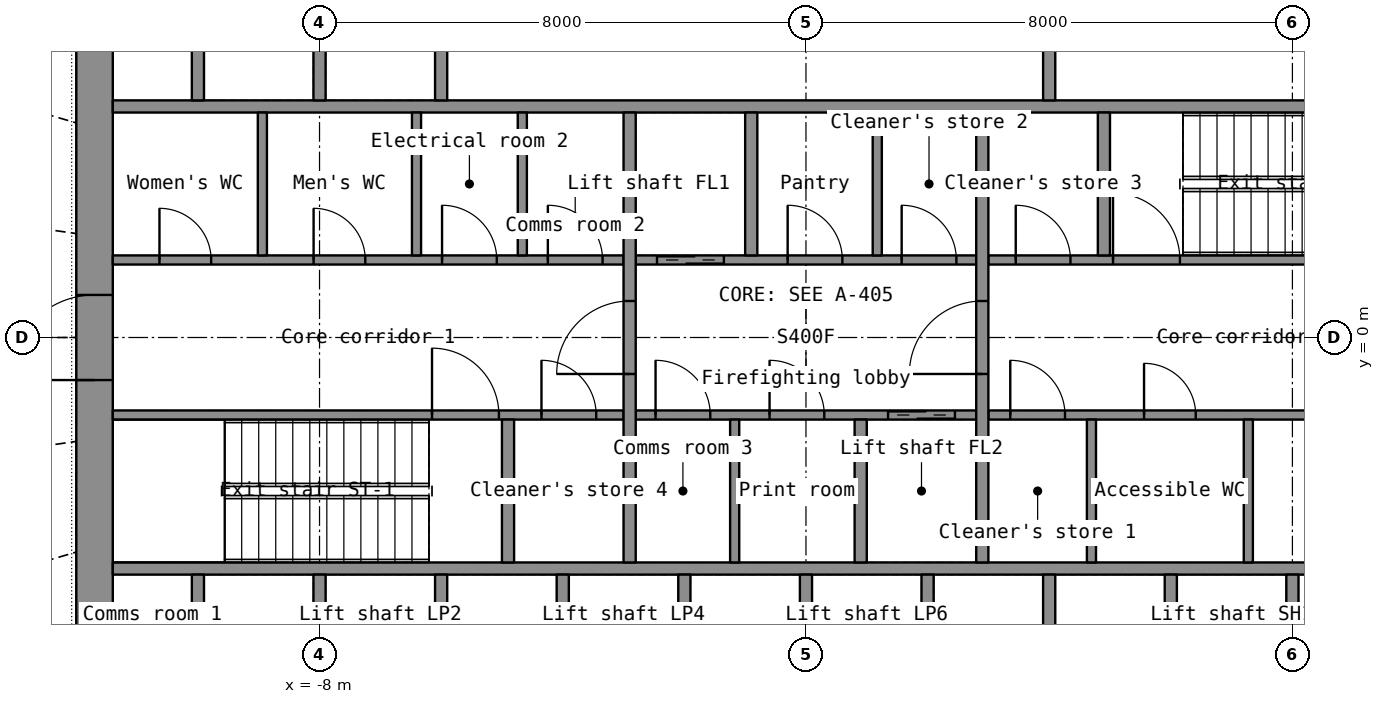
"""IFC4 building model, lengths in metres.
Left out: names, types, materials, properties, quantities, classifications, styles, units other than length and angle.
Written with IfcOpenShell. Run it as: python <this file> out.ifc"""

import sys

from ifc_helpers import new_model, si_unit, direction, frame, frame_2d, origin, place, context, subcontext, project, spatial, rectangle, extrude, element, fill, save


model = new_model("IFC4")
c1 = context("Model", 3, precision=1e-05, world=origin(), true_north=direction((0.0, 1.0)))
c2 = subcontext(c1, "Body", "Model", "MODEL_VIEW")
j1 = project(units=[si_unit("LENGTHUNIT", "METRE"), si_unit("PLANEANGLEUNIT", "RADIAN")], contexts=[c1])
p1 = place(None, origin())
s1 = spatial("IfcSite", under=j1, at=p1, CompositionType="ELEMENT")
p2 = place(p1, origin())
s2 = spatial("IfcBuilding", under=s1, at=p2, CompositionType="ELEMENT")
p3 = place(p2, frame((0.0, 0.0, 20.0)))
s3 = spatial("IfcBuildingStorey", under=s2, at=p3, CompositionType="ELEMENT", Elevation=20.0)
p4 = place(p3, frame((-11.7, -7.2, 0.0), z_axis=(0.0, 0.0, 1.0), x_axis=(0.0, 1.0, 0.0)))
e1 = element("IfcWall", 1, at=p4, inside=s3, PredefinedType="SHEAR", context=c2, shape_type="SweptSolid", body=[
    extrude(rectangle(XDim=14.4, YDim=0.6, at=frame_2d((7.2, 0.0))), origin(), (0.0, 0.0, 1.0), 4.1),
])
p5 = place(p4, frame((6.5, 0.0, 0.0)))
e2 = element("IfcOpeningElement", 2, at=p5, cuts=e1, PredefinedType="OPENING", context=c2, shape_type="SweptSolid", body=[
    extrude(rectangle(XDim=1.4, YDim=2.2, at=frame_2d((0.7, 1.1))), frame((0.0, 0.31, 0.0), z_axis=(0.0, -1.0, 0.0), x_axis=(1.0, 0.0, 0.0)), (0.0, 0.0, 1.0), 0.62),
])
for number, where, z_axis, x_axis in (
    (3, (-11.4, -3.8, 0.0), (0.0, 0.0, 1.0), (1.0, 0.0, 0.0)),
    (4, (-11.4, 3.8, 0.0), (0.0, 0.0, 1.0), (1.0, 0.0, 0.0)),
):
    element("IfcWall", number, at=place(p3, frame(where, z_axis=z_axis, x_axis=x_axis)), inside=s3, PredefinedType="SHEAR", context=c2, shape_type="SweptSolid", body=[
        extrude(rectangle(XDim=22.8, YDim=0.2, at=frame_2d((11.4, 0.0))), origin(), (0.0, 0.0, 1.0), 4.1),
    ])
for number, where, z_axis, x_axis in (
    (5, (-10.0, -6.6, 0.0), (0.0, 0.0, 1.0), (0.0, 1.0, 0.0)),
    (6, (-8.0, -6.6, 0.0), (0.0, 0.0, 1.0), (0.0, 1.0, 0.0)),
    (7, (-6.0, -6.6, 0.0), (0.0, 0.0, 1.0), (0.0, 1.0, 0.0)),
    (8, (-4.0, -6.6, 0.0), (0.0, 0.0, 1.0), (0.0, 1.0, 0.0)),
    (9, (-2.0, -6.6, 0.0), (0.0, 0.0, 1.0), (0.0, 1.0, 0.0)),
    (10, (0.0, -6.6, 0.0), (0.0, 0.0, 1.0), (0.0, 1.0, 0.0)),
    (11, (2.0, -6.6, 0.0), (0.0, 0.0, 1.0), (0.0, 1.0, 0.0)),
    (12, (4.0, -6.6, 0.0), (0.0, 0.0, 1.0), (0.0, 1.0, 0.0)),
    (13, (6.0, -6.6, 0.0), (0.0, 0.0, 1.0), (0.0, 1.0, 0.0)),
    (14, (8.0, -6.6, 0.0), (0.0, 0.0, 1.0), (0.0, 1.0, 0.0)),
    (15, (-10.0, 3.9, 0.0), (0.0, 0.0, 1.0), (0.0, 1.0, 0.0)),
    (16, (-8.0, 3.9, 0.0), (0.0, 0.0, 1.0), (0.0, 1.0, 0.0)),
    (17, (-6.0, 3.9, 0.0), (0.0, 0.0, 1.0), (0.0, 1.0, 0.0)),
):
    element("IfcWall", number, at=place(p3, frame(where, z_axis=z_axis, x_axis=x_axis)), inside=s3, PredefinedType="SHEAR", context=c2, shape_type="SweptSolid", body=[
        extrude(rectangle(XDim=2.7, YDim=0.2, at=frame_2d((1.35, 0.0))), origin(), (0.0, 0.0, 1.0), 4.1),
    ])
p6 = place(p3, frame((4.0, 3.9, 0.0), z_axis=(0.0, 0.0, 1.0), x_axis=(0.0, 1.0, 0.0)))
e18 = element("IfcWall", 18, at=p6, inside=s3, PredefinedType="PARTITIONING", context=c2, shape_type="SweptSolid", body=[
    extrude(rectangle(XDim=2.7, YDim=0.2, at=frame_2d((1.35, 0.0))), origin(), (0.0, 0.0, 1.0), 4.1),
])
p7 = place(p3, frame((-11.4, -1.275, 0.0), z_axis=(0.0, 0.0, 1.0), x_axis=(1.0, 0.0, 0.0)))
e19 = element("IfcWall", 19, at=p7, inside=s3, PredefinedType="SHEAR", context=c2, shape_type="SweptSolid", body=[
    extrude(rectangle(XDim=8.4, YDim=0.15, at=frame_2d((4.2, 0.0))), origin(), (0.0, 0.0, 1.0), 4.1),
])
p8 = place(p7, frame((5.25, 0.0, 0.0)))
e20 = element("IfcOpeningElement", 20, at=p8, cuts=e19, PredefinedType="OPENING", context=c2, shape_type="SweptSolid", body=[
    extrude(rectangle(XDim=1.1, YDim=2.15, at=frame_2d((0.55, 1.075))), frame((0.0, 0.085, 0.0), z_axis=(0.0, -1.0, 0.0), x_axis=(1.0, 0.0, 0.0)), (0.0, 0.0, 1.0), 0.17),
])
p9 = place(p7, frame((7.05, 0.0, 0.0)))
e21 = element("IfcOpeningElement", 21, at=p9, cuts=e19, PredefinedType="OPENING", context=c2, shape_type="SweptSolid", body=[
    extrude(rectangle(XDim=0.9, YDim=2.1, at=frame_2d((0.45, 1.05))), frame((0.0, 0.085, 0.0), z_axis=(0.0, -1.0, 0.0), x_axis=(1.0, 0.0, 0.0)), (0.0, 0.0, 1.0), 0.17),
])
p10 = place(p3, frame((-2.8, -1.275, 0.0), z_axis=(0.0, 0.0, 1.0), x_axis=(1.0, 0.0, 0.0)))
e22 = element("IfcWall", 22, at=p10, inside=s3, PredefinedType="SHEAR", context=c2, shape_type="SweptSolid", body=[
    extrude(rectangle(XDim=5.6, YDim=0.15, at=frame_2d((2.8, 0.0))), origin(), (0.0, 0.0, 1.0), 4.1),
])
p11 = place(p10, frame((4.15, 0.0, 0.0)))
e23 = element("IfcOpeningElement", 23, at=p11, cuts=e22, PredefinedType="OPENING", context=c2, shape_type="SweptSolid", body=[
    extrude(rectangle(XDim=1.1, YDim=2.2, at=frame_2d((0.55, 1.1))), frame((0.0, 0.085, 0.0), z_axis=(0.0, -1.0, 0.0), x_axis=(1.0, 0.0, 0.0)), (0.0, 0.0, 1.0), 0.17),
])
p12 = place(p10, frame((0.326, 0.0, 0.0)))
e24 = element("IfcOpeningElement", 24, at=p12, cuts=e22, PredefinedType="OPENING", context=c2, shape_type="SweptSolid", body=[
    extrude(rectangle(XDim=0.9, YDim=2.1, at=frame_2d((0.45, 1.05))), frame((0.0, 0.085, 0.0), z_axis=(0.0, -1.0, 0.0), x_axis=(1.0, 0.0, 0.0)), (0.0, 0.0, 1.0), 0.17),
])
p13 = place(p10, frame((2.201, 0.0, 0.0)))
e25 = element("IfcOpeningElement", 25, at=p13, cuts=e22, PredefinedType="OPENING", context=c2, shape_type="SweptSolid", body=[
    extrude(rectangle(XDim=0.9, YDim=2.1, at=frame_2d((0.45, 1.05))), frame((0.0, 0.085, 0.0), z_axis=(0.0, -1.0, 0.0), x_axis=(1.0, 0.0, 0.0)), (0.0, 0.0, 1.0), 0.17),
])
p14 = place(p3, frame((3.0, -1.275, 0.0), z_axis=(0.0, 0.0, 1.0), x_axis=(1.0, 0.0, 0.0)))
e26 = element("IfcWall", 26, at=p14, inside=s3, PredefinedType="PARTITIONING", context=c2, shape_type="SweptSolid", body=[
    extrude(rectangle(XDim=8.4, YDim=0.15, at=frame_2d((4.2, 0.0))), origin(), (0.0, 0.0, 1.0), 4.1),
])
p15 = place(p14, frame((0.36, 0.0, 0.0)))
e27 = element("IfcOpeningElement", 27, at=p15, cuts=e26, PredefinedType="OPENING", context=c2, shape_type="SweptSolid", body=[
    extrude(rectangle(XDim=0.9, YDim=2.1, at=frame_2d((0.45, 1.05))), frame((0.0, 0.085, 0.0), z_axis=(0.0, -1.0, 0.0), x_axis=(1.0, 0.0, 0.0)), (0.0, 0.0, 1.0), 0.17),
])
p16 = place(p14, frame((2.56, 0.0, 0.0)))
e28 = element("IfcOpeningElement", 28, at=p16, cuts=e26, PredefinedType="OPENING", context=c2, shape_type="SweptSolid", body=[
    extrude(rectangle(XDim=0.85, YDim=2.1, at=frame_2d((0.425, 1.05))), frame((0.0, 0.085, 0.0), z_axis=(0.0, -1.0, 0.0), x_axis=(1.0, 0.0, 0.0)), (0.0, 0.0, 1.0), 0.17),
])
p17 = place(p14, frame((5.95, 0.0, 0.0)))
e29 = element("IfcOpeningElement", 29, at=p17, cuts=e26, PredefinedType="OPENING", context=c2, shape_type="SweptSolid", body=[
    extrude(rectangle(XDim=0.85, YDim=2.1, at=frame_2d((0.425, 1.05))), frame((0.0, 0.085, 0.0), z_axis=(0.0, -1.0, 0.0), x_axis=(1.0, 0.0, 0.0)), (0.0, 0.0, 1.0), 0.17),
])
p18 = place(p3, frame((-11.4, 1.275, 0.0), z_axis=(0.0, 0.0, 1.0), x_axis=(1.0, 0.0, 0.0)))
e30 = element("IfcWall", 30, at=p18, inside=s3, PredefinedType="PARTITIONING", context=c2, shape_type="SweptSolid", body=[
    extrude(rectangle(XDim=8.4, YDim=0.15, at=frame_2d((4.2, 0.0))), origin(), (0.0, 0.0, 1.0), 4.1),
])
p19 = place(p18, frame((0.768, 0.0, 0.0)))
e31 = element("IfcOpeningElement", 31, at=p19, cuts=e30, PredefinedType="OPENING", context=c2, shape_type="SweptSolid", body=[
    extrude(rectangle(XDim=0.85, YDim=2.1, at=frame_2d((0.425, 1.05))), frame((0.0, 0.085, 0.0), z_axis=(0.0, -1.0, 0.0), x_axis=(1.0, 0.0, 0.0)), (0.0, 0.0, 1.0), 0.17),
])
p20 = place(p18, frame((3.302, 0.0, 0.0)))
e32 = element("IfcOpeningElement", 32, at=p20, cuts=e30, PredefinedType="OPENING", context=c2, shape_type="SweptSolid", body=[
    extrude(rectangle(XDim=0.85, YDim=2.1, at=frame_2d((0.425, 1.05))), frame((0.0, 0.085, 0.0), z_axis=(0.0, -1.0, 0.0), x_axis=(1.0, 0.0, 0.0)), (0.0, 0.0, 1.0), 0.17),
])
p21 = place(p18, frame((5.415, 0.0, 0.0)))
e33 = element("IfcOpeningElement", 33, at=p21, cuts=e30, PredefinedType="OPENING", context=c2, shape_type="SweptSolid", body=[
    extrude(rectangle(XDim=0.9, YDim=2.1, at=frame_2d((0.45, 1.05))), frame((0.0, 0.085, 0.0), z_axis=(0.0, -1.0, 0.0), x_axis=(1.0, 0.0, 0.0)), (0.0, 0.0, 1.0), 0.17),
])
p22 = place(p18, frame((7.155, 0.0, 0.0)))
e34 = element("IfcOpeningElement", 34, at=p22, cuts=e30, PredefinedType="OPENING", context=c2, shape_type="SweptSolid", body=[
    extrude(rectangle(XDim=0.9, YDim=2.1, at=frame_2d((0.45, 1.05))), frame((0.0, 0.085, 0.0), z_axis=(0.0, -1.0, 0.0), x_axis=(1.0, 0.0, 0.0)), (0.0, 0.0, 1.0), 0.17),
])
p23 = place(p3, frame((-2.8, 1.275, 0.0), z_axis=(0.0, 0.0, 1.0), x_axis=(1.0, 0.0, 0.0)))
e35 = element("IfcWall", 35, at=p23, inside=s3, PredefinedType="SHEAR", context=c2, shape_type="SweptSolid", body=[
    extrude(rectangle(XDim=5.6, YDim=0.15, at=frame_2d((2.8, 0.0))), origin(), (0.0, 0.0, 1.0), 4.1),
])
p24 = place(p23, frame((0.35, 0.0, 0.0)))
e36 = element("IfcOpeningElement", 36, at=p24, cuts=e35, PredefinedType="OPENING", context=c2, shape_type="SweptSolid", body=[
    extrude(rectangle(XDim=1.1, YDim=2.2, at=frame_2d((0.55, 1.1))), frame((0.0, 0.085, 0.0), z_axis=(0.0, -1.0, 0.0), x_axis=(1.0, 0.0, 0.0)), (0.0, 0.0, 1.0), 0.17),
])
p25 = place(p23, frame((2.499, 0.0, 0.0)))
e37 = element("IfcOpeningElement", 37, at=p25, cuts=e35, PredefinedType="OPENING", context=c2, shape_type="SweptSolid", body=[
    extrude(rectangle(XDim=0.9, YDim=2.1, at=frame_2d((0.45, 1.05))), frame((0.0, 0.085, 0.0), z_axis=(0.0, -1.0, 0.0), x_axis=(1.0, 0.0, 0.0)), (0.0, 0.0, 1.0), 0.17),
])
p26 = place(p23, frame((4.374, 0.0, 0.0)))
e38 = element("IfcOpeningElement", 38, at=p26, cuts=e35, PredefinedType="OPENING", context=c2, shape_type="SweptSolid", body=[
    extrude(rectangle(XDim=0.9, YDim=2.1, at=frame_2d((0.45, 1.05))), frame((0.0, 0.085, 0.0), z_axis=(0.0, -1.0, 0.0), x_axis=(1.0, 0.0, 0.0)), (0.0, 0.0, 1.0), 0.17),
])
p27 = place(p3, frame((3.0, 1.275, 0.0), z_axis=(0.0, 0.0, 1.0), x_axis=(1.0, 0.0, 0.0)))
e39 = element("IfcWall", 39, at=p27, inside=s3, PredefinedType="SHEAR", context=c2, shape_type="SweptSolid", body=[
    extrude(rectangle(XDim=8.4, YDim=0.15, at=frame_2d((4.2, 0.0))), origin(), (0.0, 0.0, 1.0), 4.1),
])
p28 = place(p27, frame((2.05, 0.0, 0.0)))
e40 = element("IfcOpeningElement", 40, at=p28, cuts=e39, PredefinedType="OPENING", context=c2, shape_type="SweptSolid", body=[
    extrude(rectangle(XDim=1.1, YDim=2.15, at=frame_2d((0.55, 1.075))), frame((0.0, 0.085, 0.0), z_axis=(0.0, -1.0, 0.0), x_axis=(1.0, 0.0, 0.0)), (0.0, 0.0, 1.0), 0.17),
])
p29 = place(p27, frame((0.45, 0.0, 0.0)))
e41 = element("IfcOpeningElement", 41, at=p29, cuts=e39, PredefinedType="OPENING", context=c2, shape_type="SweptSolid", body=[
    extrude(rectangle(XDim=0.9, YDim=2.1, at=frame_2d((0.45, 1.05))), frame((0.0, 0.085, 0.0), z_axis=(0.0, -1.0, 0.0), x_axis=(1.0, 0.0, 0.0)), (0.0, 0.0, 1.0), 0.17),
])
p30 = place(p3, frame((-2.9, -3.7, 0.0), z_axis=(0.0, 0.0, 1.0), x_axis=(0.0, 1.0, 0.0)))
e42 = element("IfcWall", 42, at=p30, inside=s3, PredefinedType="SHEAR", context=c2, shape_type="SweptSolid", body=[
    extrude(rectangle(XDim=7.4, YDim=0.2, at=frame_2d((3.7, 0.0))), origin(), (0.0, 0.0, 1.0), 4.1),
])
p31 = place(p30, frame((3.1, 0.0, 0.0)))
e43 = element("IfcOpeningElement", 43, at=p31, cuts=e42, PredefinedType="OPENING", context=c2, shape_type="SweptSolid", body=[
    extrude(rectangle(XDim=1.2, YDim=2.2, at=frame_2d((0.6, 1.1))), frame((0.0, 0.11, 0.0), z_axis=(0.0, -1.0, 0.0), x_axis=(1.0, 0.0, 0.0)), (0.0, 0.0, 1.0), 0.22),
])
p32 = place(p3, frame((2.9, -3.7, 0.0), z_axis=(0.0, 0.0, 1.0), x_axis=(0.0, 1.0, 0.0)))
e44 = element("IfcWall", 44, at=p32, inside=s3, PredefinedType="SHEAR", context=c2, shape_type="SweptSolid", body=[
    extrude(rectangle(XDim=7.4, YDim=0.2, at=frame_2d((3.7, 0.0))), origin(), (0.0, 0.0, 1.0), 4.1),
])
p33 = place(p32, frame((3.1, 0.0, 0.0)))
e45 = element("IfcOpeningElement", 45, at=p33, cuts=e44, PredefinedType="OPENING", context=c2, shape_type="SweptSolid", body=[
    extrude(rectangle(XDim=1.2, YDim=2.2, at=frame_2d((0.6, 1.1))), frame((0.0, 0.11, 0.0), z_axis=(0.0, -1.0, 0.0), x_axis=(1.0, 0.0, 0.0)), (0.0, 0.0, 1.0), 0.22),
])
for number, where, z_axis, x_axis in (
    (46, (-0.9, 1.35, 0.0), (0.0, 0.0, 1.0), (0.0, 1.0, 0.0)),
    (47, (0.9, -3.7, 0.0), (0.0, 0.0, 1.0), (0.0, 1.0, 0.0)),
    (48, (-4.9, -3.7, 0.0), (0.0, 0.0, 1.0), (0.0, 1.0, 0.0)),
    (49, (4.9, 1.35, 0.0), (0.0, 0.0, 1.0), (0.0, 1.0, 0.0)),
):
    element("IfcWall", number, at=place(p3, frame(where, z_axis=z_axis, x_axis=x_axis)), inside=s3, PredefinedType="SHEAR", context=c2, shape_type="SweptSolid", body=[
        extrude(rectangle(XDim=2.35, YDim=0.2, at=frame_2d((1.175, 0.0))), origin(), (0.0, 0.0, 1.0), 4.1),
    ])
for number, where, z_axis, x_axis in (
    (50, (-8.94, 1.35, 0.0), (0.0, 0.0, 1.0), (0.0, 1.0, 0.0)),
    (51, (-6.405, 1.35, 0.0), (0.0, 0.0, 1.0), (0.0, 1.0, 0.0)),
    (52, (-4.665, 1.35, 0.0), (0.0, 0.0, 1.0), (0.0, 1.0, 0.0)),
    (53, (4.695, -3.7, 0.0), (0.0, 0.0, 1.0), (0.0, 1.0, 0.0)),
    (54, (7.275, -3.7, 0.0), (0.0, 0.0, 1.0), (0.0, 1.0, 0.0)),
    (55, (1.173, 1.35, 0.0), (0.0, 0.0, 1.0), (0.0, 1.0, 0.0)),
    (56, (-1.173, -3.7, 0.0), (0.0, 0.0, 1.0), (0.0, 1.0, 0.0)),
):
    element("IfcWall", number, at=place(p3, frame(where, z_axis=z_axis, x_axis=x_axis)), inside=s3, PredefinedType="PARTITIONING", context=c2, shape_type="SweptSolid", body=[
        extrude(rectangle(XDim=2.35, YDim=0.15, at=frame_2d((1.175, 0.0))), origin(), (0.0, 0.0, 1.0), 4.1),
    ])
p34 = place(p5, origin())
e57 = element("IfcDoor", 57, at=p34, inside=s3, OperationType="DOUBLE_DOOR_SINGLE_SWING", PredefinedType="DOOR", context=c2, shape_type="SweptSolid", body=[
    extrude(rectangle(XDim=1.4, YDim=2.2, at=frame_2d((0.7, 1.1))), frame((0.0, 0.025, 0.0), z_axis=(0.0, -1.0, 0.0), x_axis=(1.0, 0.0, 0.0)), (0.0, 0.0, 1.0), 0.05),
])
fill(e2, e57)
p35 = place(p31, origin())
e58 = element("IfcDoor", 58, at=p35, inside=s3, OperationType="SINGLE_SWING_LEFT", PredefinedType="DOOR", context=c2, shape_type="SweptSolid", body=[
    extrude(rectangle(XDim=1.2, YDim=2.2, at=frame_2d((0.6, 1.1))), frame((0.0, 0.025, 0.0), z_axis=(0.0, -1.0, 0.0), x_axis=(1.0, 0.0, 0.0)), (0.0, 0.0, 1.0), 0.05),
])
fill(e43, e58)
p36 = place(p33, origin())
e59 = element("IfcDoor", 59, at=p36, inside=s3, OperationType="SINGLE_SWING_LEFT", PredefinedType="DOOR", context=c2, shape_type="SweptSolid", body=[
    extrude(rectangle(XDim=1.2, YDim=2.2, at=frame_2d((0.6, 1.1))), frame((0.0, 0.025, 0.0), z_axis=(0.0, -1.0, 0.0), x_axis=(1.0, 0.0, 0.0)), (0.0, 0.0, 1.0), 0.05),
])
fill(e45, e59)
p37 = place(p24, origin())
e60 = element("IfcDoor", 60, at=p37, inside=s3, OperationType="DOUBLE_DOOR_SLIDING", PredefinedType="DOOR", context=c2, shape_type="SweptSolid", body=[
    extrude(rectangle(XDim=1.1, YDim=2.2, at=frame_2d((0.55, 1.1))), frame((0.0, 0.025, 0.0), z_axis=(0.0, -1.0, 0.0), x_axis=(1.0, 0.0, 0.0)), (0.0, 0.0, 1.0), 0.05),
])
fill(e36, e60)
p38 = place(p11, origin())
e61 = element("IfcDoor", 61, at=p38, inside=s3, OperationType="DOUBLE_DOOR_SLIDING", PredefinedType="DOOR", context=c2, shape_type="SweptSolid", body=[
    extrude(rectangle(XDim=1.1, YDim=2.2, at=frame_2d((0.55, 1.1))), frame((0.0, 0.025, 0.0), z_axis=(0.0, -1.0, 0.0), x_axis=(1.0, 0.0, 0.0)), (0.0, 0.0, 1.0), 0.05),
])
fill(e23, e61)
p39 = place(p8, origin())
e62 = element("IfcDoor", 62, at=p39, inside=s3, OperationType="SINGLE_SWING_LEFT", PredefinedType="DOOR", context=c2, shape_type="SweptSolid", body=[
    extrude(rectangle(XDim=1.1, YDim=2.15, at=frame_2d((0.55, 1.075))), frame((0.0, 0.025, 0.0), z_axis=(0.0, -1.0, 0.0), x_axis=(1.0, 0.0, 0.0)), (0.0, 0.0, 1.0), 0.05),
])
fill(e20, e62)
p40 = place(p28, origin())
e63 = element("IfcDoor", 63, at=p40, inside=s3, OperationType="SINGLE_SWING_LEFT", PredefinedType="DOOR", context=c2, shape_type="SweptSolid", body=[
    extrude(rectangle(XDim=1.1, YDim=2.15, at=frame_2d((0.55, 1.075))), frame((0.0, 0.025, 0.0), z_axis=(0.0, -1.0, 0.0), x_axis=(1.0, 0.0, 0.0)), (0.0, 0.0, 1.0), 0.05),
])
fill(e40, e63)
p41 = place(p19, origin())
e64 = element("IfcDoor", 64, at=p41, inside=s3, OperationType="SINGLE_SWING_LEFT", PredefinedType="DOOR", context=c2, shape_type="SweptSolid", body=[
    extrude(rectangle(XDim=0.85, YDim=2.1, at=frame_2d((0.425, 1.05))), frame((0.0, 0.025, 0.0), z_axis=(0.0, -1.0, 0.0), x_axis=(1.0, 0.0, 0.0)), (0.0, 0.0, 1.0), 0.05),
])
fill(e31, e64)
p42 = place(p20, origin())
e65 = element("IfcDoor", 65, at=p42, inside=s3, OperationType="SINGLE_SWING_LEFT", PredefinedType="DOOR", context=c2, shape_type="SweptSolid", body=[
    extrude(rectangle(XDim=0.85, YDim=2.1, at=frame_2d((0.425, 1.05))), frame((0.0, 0.025, 0.0), z_axis=(0.0, -1.0, 0.0), x_axis=(1.0, 0.0, 0.0)), (0.0, 0.0, 1.0), 0.05),
])
fill(e32, e65)
p43 = place(p21, origin())
e66 = element("IfcDoor", 66, at=p43, inside=s3, OperationType="SINGLE_SWING_LEFT", PredefinedType="DOOR", context=c2, shape_type="SweptSolid", body=[
    extrude(rectangle(XDim=0.9, YDim=2.1, at=frame_2d((0.45, 1.05))), frame((0.0, 0.025, 0.0), z_axis=(0.0, -1.0, 0.0), x_axis=(1.0, 0.0, 0.0)), (0.0, 0.0, 1.0), 0.05),
])
fill(e33, e66)
p44 = place(p22, origin())
e67 = element("IfcDoor", 67, at=p44, inside=s3, OperationType="SINGLE_SWING_LEFT", PredefinedType="DOOR", context=c2, shape_type="SweptSolid", body=[
    extrude(rectangle(XDim=0.9, YDim=2.1, at=frame_2d((0.45, 1.05))), frame((0.0, 0.025, 0.0), z_axis=(0.0, -1.0, 0.0), x_axis=(1.0, 0.0, 0.0)), (0.0, 0.0, 1.0), 0.05),
])
fill(e34, e67)
p45 = place(p15, origin())
e68 = element("IfcDoor", 68, at=p45, inside=s3, OperationType="SINGLE_SWING_LEFT", PredefinedType="DOOR", context=c2, shape_type="SweptSolid", body=[
    extrude(rectangle(XDim=0.9, YDim=2.1, at=frame_2d((0.45, 1.05))), frame((0.0, 0.025, 0.0), z_axis=(0.0, -1.0, 0.0), x_axis=(1.0, 0.0, 0.0)), (0.0, 0.0, 1.0), 0.05),
])
fill(e27, e68)
p46 = place(p16, origin())
e69 = element("IfcDoor", 69, at=p46, inside=s3, OperationType="SINGLE_SWING_LEFT", PredefinedType="DOOR", context=c2, shape_type="SweptSolid", body=[
    extrude(rectangle(XDim=0.85, YDim=2.1, at=frame_2d((0.425, 1.05))), frame((0.0, 0.025, 0.0), z_axis=(0.0, -1.0, 0.0), x_axis=(1.0, 0.0, 0.0)), (0.0, 0.0, 1.0), 0.05),
])
fill(e28, e69)
p47 = place(p25, origin())
e70 = element("IfcDoor", 70, at=p47, inside=s3, OperationType="SINGLE_SWING_LEFT", PredefinedType="DOOR", context=c2, shape_type="SweptSolid", body=[
    extrude(rectangle(XDim=0.9, YDim=2.1, at=frame_2d((0.45, 1.05))), frame((0.0, 0.025, 0.0), z_axis=(0.0, -1.0, 0.0), x_axis=(1.0, 0.0, 0.0)), (0.0, 0.0, 1.0), 0.05),
])
fill(e37, e70)
p48 = place(p26, origin())
e71 = element("IfcDoor", 71, at=p48, inside=s3, OperationType="SINGLE_SWING_LEFT", PredefinedType="DOOR", context=c2, shape_type="SweptSolid", body=[
    extrude(rectangle(XDim=0.9, YDim=2.1, at=frame_2d((0.45, 1.05))), frame((0.0, 0.025, 0.0), z_axis=(0.0, -1.0, 0.0), x_axis=(1.0, 0.0, 0.0)), (0.0, 0.0, 1.0), 0.05),
])
fill(e38, e71)
p49 = place(p12, origin())
e72 = element("IfcDoor", 72, at=p49, inside=s3, OperationType="SINGLE_SWING_LEFT", PredefinedType="DOOR", context=c2, shape_type="SweptSolid", body=[
    extrude(rectangle(XDim=0.9, YDim=2.1, at=frame_2d((0.45, 1.05))), frame((0.0, 0.025, 0.0), z_axis=(0.0, -1.0, 0.0), x_axis=(1.0, 0.0, 0.0)), (0.0, 0.0, 1.0), 0.05),
])
fill(e24, e72)
p50 = place(p13, origin())
e73 = element("IfcDoor", 73, at=p50, inside=s3, OperationType="SINGLE_SWING_LEFT", PredefinedType="DOOR", context=c2, shape_type="SweptSolid", body=[
    extrude(rectangle(XDim=0.9, YDim=2.1, at=frame_2d((0.45, 1.05))), frame((0.0, 0.025, 0.0), z_axis=(0.0, -1.0, 0.0), x_axis=(1.0, 0.0, 0.0)), (0.0, 0.0, 1.0), 0.05),
])
fill(e25, e73)
p51 = place(p29, origin())
e74 = element("IfcDoor", 74, at=p51, inside=s3, OperationType="SINGLE_SWING_LEFT", PredefinedType="DOOR", context=c2, shape_type="SweptSolid", body=[
    extrude(rectangle(XDim=0.9, YDim=2.1, at=frame_2d((0.45, 1.05))), frame((0.0, 0.025, 0.0), z_axis=(0.0, -1.0, 0.0), x_axis=(1.0, 0.0, 0.0)), (0.0, 0.0, 1.0), 0.05),
])
fill(e41, e74)
p52 = place(p9, origin())
e75 = element("IfcDoor", 75, at=p52, inside=s3, OperationType="SINGLE_SWING_LEFT", PredefinedType="DOOR", context=c2, shape_type="SweptSolid", body=[
    extrude(rectangle(XDim=0.9, YDim=2.1, at=frame_2d((0.45, 1.05))), frame((0.0, 0.025, 0.0), z_axis=(0.0, -1.0, 0.0), x_axis=(1.0, 0.0, 0.0)), (0.0, 0.0, 1.0), 0.05),
])
fill(e21, e75)
save(model, sys.argv[1])
